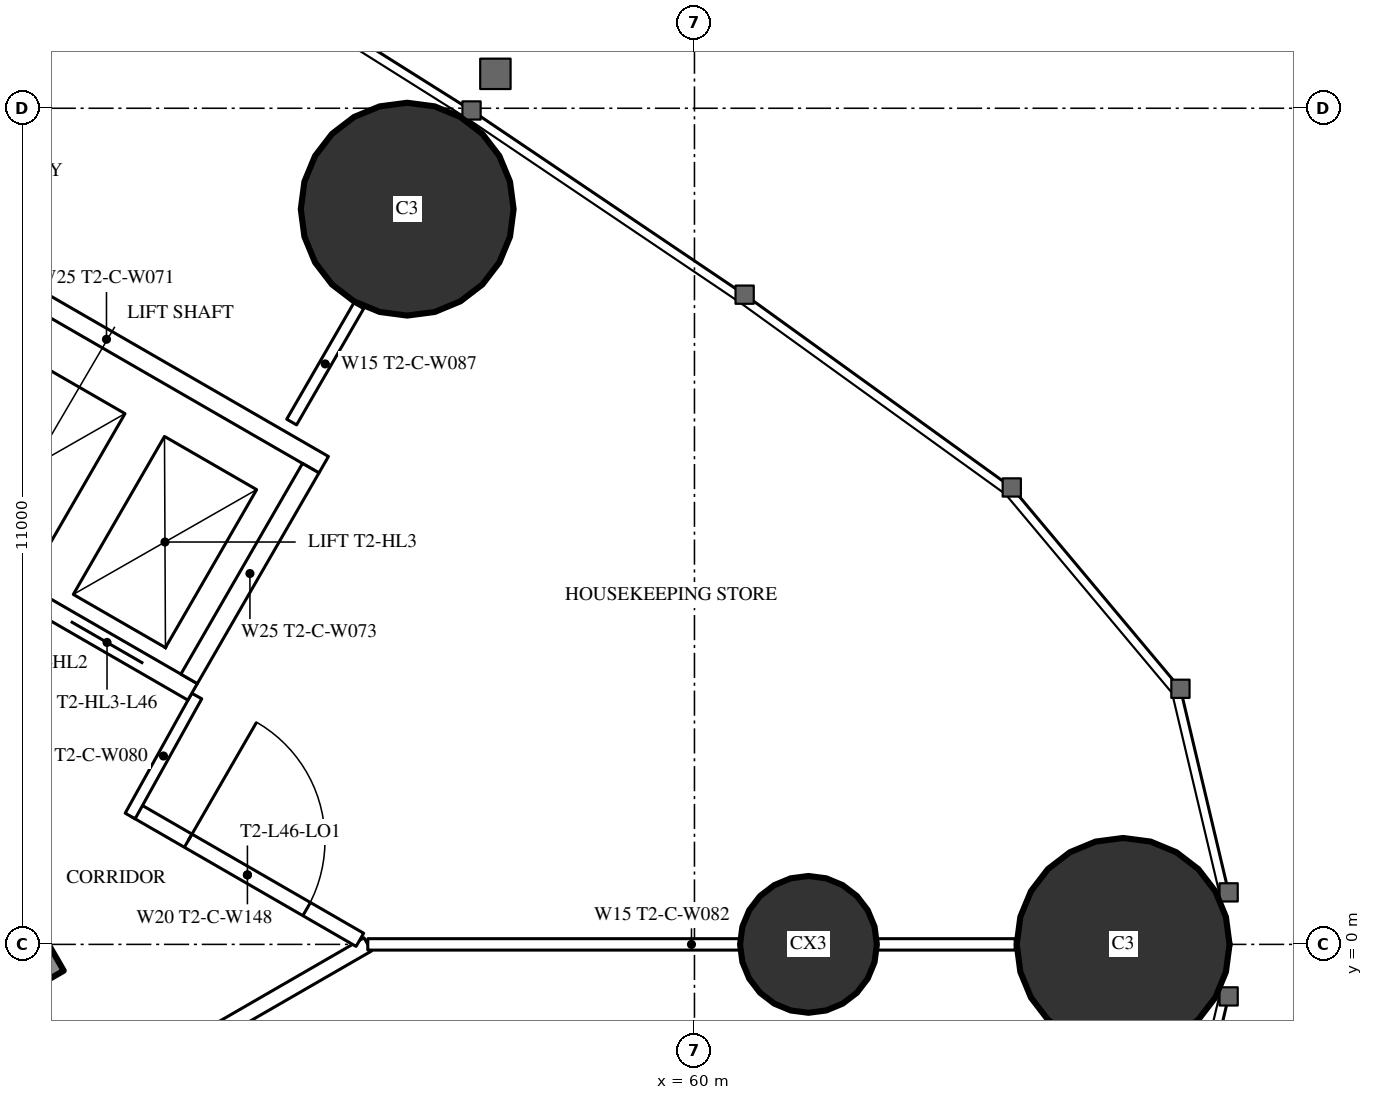
"""IFC4 building model, lengths in metres.
Left out: names, types, materials, properties, quantities, classifications, styles, units other than length and angle.
Written with IfcOpenShell. Run it as: python <this file> out.ifc"""

import sys

from ifc_helpers import new_model, si_unit, direction, frame, frame_2d, origin, origin_2d, place, context, subcontext, project, spatial, rectangle, circle, extrude, element, fill, save


model = new_model("IFC4")
c1 = context("Model", 3, precision=1e-05, world=origin(), true_north=direction((0.0, 1.0)))
c2 = subcontext(c1, "Body", "Model", "MODEL_VIEW")
j1 = project(units=[si_unit("LENGTHUNIT", "METRE"), si_unit("PLANEANGLEUNIT", "RADIAN")], contexts=[c1])
p1 = place(None, origin())
s1 = spatial("IfcSite", under=j1, at=p1, CompositionType="ELEMENT")
p2 = place(p1, origin())
s2 = spatial("IfcBuilding", under=s1, at=p2, CompositionType="ELEMENT")
p3 = place(p2, frame((0.0, 0.0, 173.8)))
s3 = spatial("IfcBuildingStorey", under=s2, at=p3, CompositionType="ELEMENT", Elevation=173.8)
for number, where, z_axis, x_axis in (
    (1, (65.64, 0.0, 0.0), (0.0, 0.0, 1.0), (1.0, 0.0, 0.0)),
    (2, (56.221, 9.672, 0.0), (0.0, 0.0, 1.0), (1.0, 0.0, 0.0)),
):
    element("IfcColumn", number, at=place(p3, frame(where, z_axis=z_axis, x_axis=x_axis)), inside=s3, PredefinedType="COLUMN", context=c2, shape_type="SweptSolid", body=[
        extrude(circle(Radius=1.4, at=origin_2d()), origin(), (0.0, 0.0, 1.0), 3.5),
    ])
p4 = place(p3, frame((61.5, 0.0, 0.0), z_axis=(0.0, 0.0, 1.0), x_axis=(1.0, 0.0, 0.0)))
e3 = element("IfcColumn", 3, at=p4, inside=s3, PredefinedType="COLUMN", context=c2, shape_type="SweptSolid", body=[
    extrude(circle(Radius=0.9, at=origin_2d()), origin(), (0.0, 0.0, 1.0), 3.5),
])
p5 = place(p3, frame((27.2, -13.8, 0.0), z_axis=(0.0, 0.0, 1.0), x_axis=(0.866027159892, 0.499996958321, 0.0)))
e4 = element("IfcWall", 4, at=p5, inside=s3, PredefinedType="SHEAR", context=c2, shape_type="SweptSolid", body=[
    extrude(rectangle(XDim=27.947, YDim=1.2, at=frame_2d((13.973, 0.0))), origin(), (0.0, 0.0, 1.0), 3.5),
])
p6 = place(p5, frame((4.6, 0.0, 0.0)))
e5 = element("IfcOpeningElement", 5, at=p6, cuts=e4, PredefinedType="OPENING", context=c2, shape_type="SweptSolid", body=[
    extrude(rectangle(XDim=1.0, YDim=2.2, at=frame_2d((0.5, 1.1))), frame((0.0, 0.61, 0.0), z_axis=(0.0, -1.0, 0.0), x_axis=(1.0, 0.0, 0.0)), (0.0, 0.0, 1.0), 1.22),
])
p7 = place(p5, frame((13.395, 0.0, 0.0)))
e6 = element("IfcOpeningElement", 6, at=p7, cuts=e4, PredefinedType="OPENING", context=c2, shape_type="SweptSolid", body=[
    extrude(rectangle(XDim=1.8, YDim=2.2, at=frame_2d((0.9, 1.1))), frame((0.0, 0.61, 0.0), z_axis=(0.0, -1.0, 0.0), x_axis=(1.0, 0.0, 0.0)), (0.0, 0.0, 1.0), 1.22),
])
p8 = place(p3, frame((27.959, -16.017, 0.0), z_axis=(0.0, 0.0, 1.0), x_axis=(0.866024151371, 0.500002169237, 0.0)))
e7 = element("IfcWall", 7, at=p8, inside=s3, PredefinedType="PARTITIONING", context=c2, shape_type="SweptSolid", body=[
    extrude(rectangle(XDim=32.034, YDim=0.2, at=frame_2d((16.017, 0.0))), origin(), (0.0, 0.0, 1.0), 3.25),
])
p9 = place(p8, frame((4.765, 0.0, 0.0)))
e8 = element("IfcOpeningElement", 8, at=p9, cuts=e7, PredefinedType="OPENING", context=c2, shape_type="SweptSolid", body=[
    extrude(rectangle(XDim=0.95, YDim=2.2, at=frame_2d((0.475, 1.1))), frame((0.0, 0.11, 0.0), z_axis=(0.0, -1.0, 0.0), x_axis=(1.0, 0.0, 0.0)), (0.0, 0.0, 1.0), 0.22),
])
p10 = place(p8, frame((9.215, 0.0, 0.0)))
e9 = element("IfcOpeningElement", 9, at=p10, cuts=e7, PredefinedType="OPENING", context=c2, shape_type="SweptSolid", body=[
    extrude(rectangle(XDim=1.0, YDim=2.2, at=frame_2d((0.5, 1.1))), frame((0.0, 0.11, 0.0), z_axis=(0.0, -1.0, 0.0), x_axis=(1.0, 0.0, 0.0)), (0.0, 0.0, 1.0), 0.22),
])
p11 = place(p8, frame((19.725, 0.0, 0.0)))
e10 = element("IfcOpeningElement", 10, at=p11, cuts=e7, PredefinedType="OPENING", context=c2, shape_type="SweptSolid", body=[
    extrude(rectangle(XDim=0.95, YDim=2.2, at=frame_2d((0.475, 1.1))), frame((0.0, 0.11, 0.0), z_axis=(0.0, -1.0, 0.0), x_axis=(1.0, 0.0, 0.0)), (0.0, 0.0, 1.0), 0.22),
])
p12 = place(p8, frame((26.125, 0.0, 0.0)))
e11 = element("IfcOpeningElement", 11, at=p12, cuts=e7, PredefinedType="OPENING", context=c2, shape_type="SweptSolid", body=[
    extrude(rectangle(XDim=0.95, YDim=2.2, at=frame_2d((0.475, 1.1))), frame((0.0, 0.11, 0.0), z_axis=(0.0, -1.0, 0.0), x_axis=(1.0, 0.0, 0.0)), (0.0, 0.0, 1.0), 0.22),
])
p13 = place(p8, frame((28.106, 0.0, 0.0)))
e12 = element("IfcOpeningElement", 12, at=p13, cuts=e7, PredefinedType="OPENING", context=c2, shape_type="SweptSolid", body=[
    extrude(rectangle(XDim=0.95, YDim=2.2, at=frame_2d((0.475, 1.1))), frame((0.0, 0.11, 0.0), z_axis=(0.0, -1.0, 0.0), x_axis=(1.0, 0.0, 0.0)), (0.0, 0.0, 1.0), 0.22),
])
p14 = place(p3, frame((55.702, 0.0, 0.0), z_axis=(0.0, 0.0, 1.0), x_axis=(1.0, 0.0, 0.0)))
e13 = element("IfcWall", 13, at=p14, inside=s3, PredefinedType="PARTITIONING", context=c2, shape_type="SweptSolid", body=[
    extrude(rectangle(XDim=8.518, YDim=0.15, at=frame_2d((4.259, 0.0))), origin(), (0.0, 0.0, 1.0), 2.3),
])
p15 = place(p3, frame((54.7, 6.872, 0.0), z_axis=(0.0, 0.0, 1.0), x_axis=(0.499989690894, 0.866031355668, 0.0)))
e14 = element("IfcWall", 14, at=p15, inside=s3, PredefinedType="PARTITIONING", context=c2, shape_type="SweptSolid", body=[
    extrude(rectangle(XDim=1.766, YDim=0.15, at=frame_2d((0.883, 0.0))), origin(), (0.0, 0.0, 1.0), 3.25),
])
p16 = place(p3, frame((52.639, 1.769, 0.0), z_axis=(0.0, 0.0, 1.0), x_axis=(0.866027340901, -0.4999966448, 0.0)))
e15 = element("IfcWall", 15, at=p16, inside=s3, PredefinedType="PARTITIONING", context=c2, shape_type="SweptSolid", body=[
    extrude(rectangle(XDim=3.417, YDim=0.2, at=frame_2d((1.708, 0.0))), origin(), (0.0, 0.0, 1.0), 3.25),
])
p17 = place(p16, frame((0.809, 0.0, 0.0)))
e16 = element("IfcOpeningElement", 16, at=p17, cuts=e15, PredefinedType="OPENING", context=c2, shape_type="SweptSolid", body=[
    extrude(rectangle(XDim=1.8, YDim=2.2, at=frame_2d((0.9, 1.1))), frame((0.0, 0.11, 0.0), z_axis=(0.0, -1.0, 0.0), x_axis=(1.0, 0.0, 0.0)), (0.0, 0.0, 1.0), 0.22),
])
p18 = place(p3, frame((52.576, 1.689, 0.0), z_axis=(0.0, 0.0, 1.0), x_axis=(0.485424724123, 0.874278466629, 0.0)))
e17 = element("IfcWall", 17, at=p18, inside=s3, PredefinedType="PARTITIONING", context=c2, shape_type="SweptSolid", body=[
    extrude(rectangle(XDim=1.805, YDim=0.15, at=frame_2d((0.903, 0.0))), origin(), (0.0, 0.0, 1.0), 3.25),
])
p19 = place(p3, frame((47.681, 6.622, 0.0), z_axis=(0.0, 0.0, 1.0), x_axis=(0.86603344179, -0.499986077507, 0.0)))
e18 = element("IfcWall", 18, at=p19, inside=s3, PredefinedType="PARTITIONING", context=c2, shape_type="SweptSolid", body=[
    extrude(rectangle(XDim=6.6, YDim=0.25, at=frame_2d((3.3, 0.0))), origin(), (0.0, 0.0, 1.0), 3.25),
])
p20 = place(p19, frame((0.75, 0.0, 0.0)))
e19 = element("IfcOpeningElement", 19, at=p20, cuts=e18, PredefinedType="OPENING", context=c2, shape_type="SweptSolid", body=[
    extrude(rectangle(XDim=1.1, YDim=2.2, at=frame_2d((0.55, 1.1))), frame((0.0, 0.135, 0.0), z_axis=(0.0, -1.0, 0.0), x_axis=(1.0, 0.0, 0.0)), (0.0, 0.0, 1.0), 0.27),
])
p21 = place(p19, frame((2.75, 0.0, 0.0)))
e20 = element("IfcOpeningElement", 20, at=p21, cuts=e18, PredefinedType="OPENING", context=c2, shape_type="SweptSolid", body=[
    extrude(rectangle(XDim=1.1, YDim=2.2, at=frame_2d((0.55, 1.1))), frame((0.0, 0.135, 0.0), z_axis=(0.0, -1.0, 0.0), x_axis=(1.0, 0.0, 0.0)), (0.0, 0.0, 1.0), 0.27),
])
p22 = place(p19, frame((4.75, 0.0, 0.0)))
e21 = element("IfcOpeningElement", 21, at=p22, cuts=e18, PredefinedType="OPENING", context=c2, shape_type="SweptSolid", body=[
    extrude(rectangle(XDim=1.1, YDim=2.2, at=frame_2d((0.55, 1.1))), frame((0.0, 0.135, 0.0), z_axis=(0.0, -1.0, 0.0), x_axis=(1.0, 0.0, 0.0)), (0.0, 0.0, 1.0), 0.27),
])
p23 = place(p3, frame((49.406, 9.611, 0.0), z_axis=(0.0, 0.0, 1.0), x_axis=(0.86603344179, -0.499986077507, 0.0)))
e22 = element("IfcWall", 22, at=p23, inside=s3, PredefinedType="PARTITIONING", context=c2, shape_type="SweptSolid", body=[
    extrude(rectangle(XDim=6.6, YDim=0.25, at=frame_2d((3.3, 0.0))), origin(), (0.0, 0.0, 1.0), 3.25),
])
p24 = place(p3, frame((53.352, 3.493, 0.0), z_axis=(0.0, 0.0, 1.0), x_axis=(0.499872130319, 0.866099216793, 0.0)))
e23 = element("IfcWall", 23, at=p24, inside=s3, PredefinedType="PARTITIONING", context=c2, shape_type="SweptSolid", body=[
    extrude(rectangle(XDim=3.2, YDim=0.25, at=frame_2d((1.6, 0.0))), origin(), (0.0, 0.0, 1.0), 3.25),
])
p25 = place(p17, origin())
e24 = element("IfcDoor", 24, at=p25, inside=s3, OperationType="DOUBLE_DOOR_SINGLE_SWING", PredefinedType="DOOR", context=c2, shape_type="SweptSolid", body=[
    extrude(rectangle(XDim=1.8, YDim=2.2, at=frame_2d((0.9, 1.1))), frame((0.0, 0.025, 0.0), z_axis=(0.0, -1.0, 0.0), x_axis=(1.0, 0.0, 0.0)), (0.0, 0.0, 1.0), 0.05),
])
fill(e16, e24)
p26 = place(p22, origin())
e25 = element("IfcDoor", 25, at=p26, inside=s3, OperationType="DOUBLE_DOOR_SLIDING", PredefinedType="USERDEFINED", context=c2, shape_type="SweptSolid", body=[
    extrude(rectangle(XDim=1.1, YDim=2.2, at=frame_2d((0.55, 1.1))), frame((0.0, 0.025, 0.0), z_axis=(0.0, -1.0, 0.0), x_axis=(1.0, 0.0, 0.0)), (0.0, 0.0, 1.0), 0.05),
])
fill(e21, e25)
save(model, sys.argv[1])
